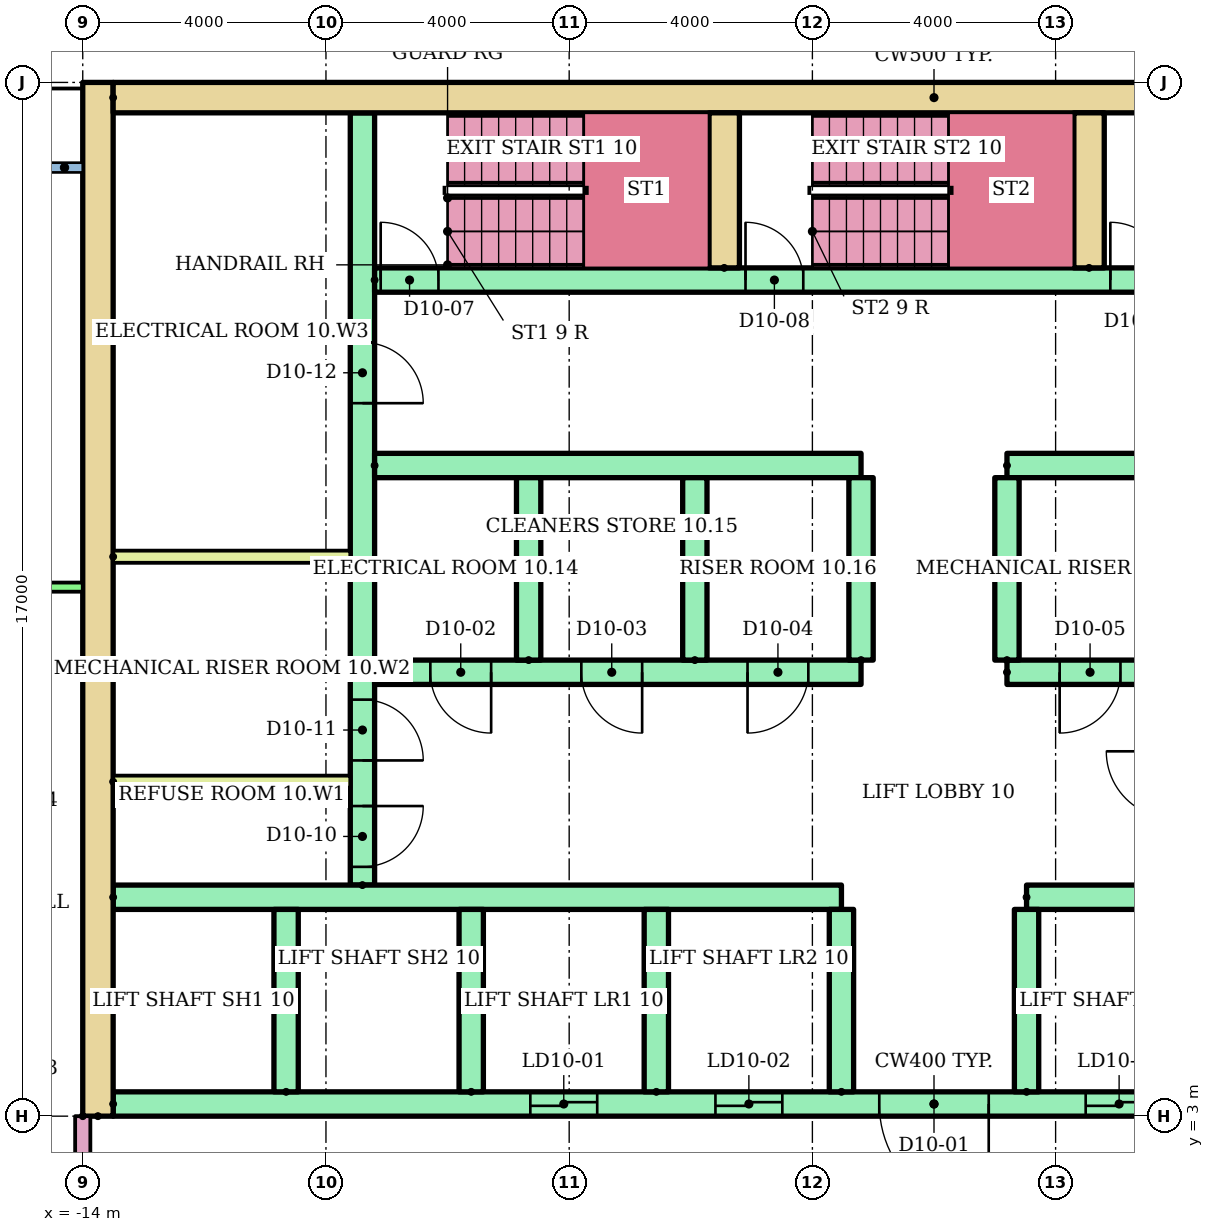
"""IFC4 building model, lengths in metres.
Left out: names, types, materials, properties, quantities, classifications, styles, units other than length and angle.
Written with IfcOpenShell. Run it as: python <this file> out.ifc"""

import sys

from ifc_helpers import new_model, si_unit, direction, frame, frame_2d, origin, place, context, subcontext, project, spatial, rectangle, extrude, element, fill, save


model = new_model("IFC4")
c1 = context("Model", 3, precision=1e-05, world=origin(), true_north=direction((0.0, 1.0)))
c2 = subcontext(c1, "Body", "Model", "MODEL_VIEW")
j1 = project(units=[si_unit("LENGTHUNIT", "METRE"), si_unit("PLANEANGLEUNIT", "RADIAN")], contexts=[c1])
p1 = place(None, origin())
s1 = spatial("IfcSite", under=j1, at=p1, CompositionType="ELEMENT")
p2 = place(p1, origin())
s2 = spatial("IfcBuilding", under=s1, at=p2, CompositionType="ELEMENT")
p3 = place(p2, frame((0.0, 0.0, 41.6)))
s3 = spatial("IfcBuildingStorey", under=s2, at=p3, CompositionType="ELEMENT", Elevation=41.6)
p4 = place(p3, frame((-13.75, 3.0, 0.0), z_axis=(0.0, 0.0, 1.0), x_axis=(0.0, 1.0, 0.0)))
e1 = element("IfcWall", 1, at=p4, inside=s3, PredefinedType="SHEAR", context=c2, shape_type="SweptSolid", body=[
    extrude(rectangle(XDim=17.0, YDim=0.5, at=frame_2d((8.5, 0.0))), origin(), (0.0, 0.0, 1.0), 2.92),
])
p5 = place(p3, frame((-13.5, 19.75, 0.0)))
e2 = element("IfcWall", 2, at=p5, inside=s3, PredefinedType="SHEAR", context=c2, shape_type="SweptSolid", body=[
    extrude(rectangle(XDim=27.0, YDim=0.5, at=frame_2d((13.5, 0.0))), origin(), (0.0, 0.0, 1.0), 2.92),
])
p6 = place(p3, frame((-9.4, 6.8, 0.0), z_axis=(0.0, 0.0, 1.0), x_axis=(0.0, 1.0, 0.0)))
e3 = element("IfcWall", 3, at=p6, inside=s3, PredefinedType="SHEAR", context=c2, shape_type="SweptSolid", body=[
    extrude(rectangle(XDim=12.7, YDim=0.4, at=frame_2d((6.35, 0.0))), origin(), (0.0, 0.0, 1.0), 2.92),
])
p7 = place(p6, frame((0.3, 0.0, 0.0)))
e4 = element("IfcOpeningElement", 4, at=p7, cuts=e3, PredefinedType="OPENING", context=c2, shape_type="SweptSolid", body=[
    extrude(rectangle(XDim=1.0, YDim=2.1, at=frame_2d((0.5, 1.05))), frame((0.0, 0.21, 0.0), z_axis=(0.0, -1.0, 0.0), x_axis=(1.0, 0.0, 0.0)), (0.0, 0.0, 1.0), 0.42),
])
p8 = place(p6, frame((2.05, 0.0, 0.0)))
e5 = element("IfcOpeningElement", 5, at=p8, cuts=e3, PredefinedType="OPENING", context=c2, shape_type="SweptSolid", body=[
    extrude(rectangle(XDim=1.0, YDim=2.1, at=frame_2d((0.5, 1.05))), frame((0.0, 0.21, 0.0), z_axis=(0.0, -1.0, 0.0), x_axis=(1.0, 0.0, 0.0)), (0.0, 0.0, 1.0), 0.42),
])
p9 = place(p6, frame((7.925, 0.0, 0.0)))
e6 = element("IfcOpeningElement", 6, at=p9, cuts=e3, PredefinedType="OPENING", context=c2, shape_type="SweptSolid", body=[
    extrude(rectangle(XDim=1.0, YDim=2.1, at=frame_2d((0.5, 1.05))), frame((0.0, 0.21, 0.0), z_axis=(0.0, -1.0, 0.0), x_axis=(1.0, 0.0, 0.0)), (0.0, 0.0, 1.0), 0.42),
])
p10 = place(p3, frame((-13.5, 3.2, 0.0)))
e7 = element("IfcWall", 7, at=p10, inside=s3, PredefinedType="SHEAR", context=c2, shape_type="SweptSolid", body=[
    extrude(rectangle(XDim=27.0, YDim=0.4, at=frame_2d((13.5, 0.0))), origin(), (0.0, 0.0, 1.0), 2.92),
])
p11 = place(p10, frame((6.861, 0.0, 0.0)))
e8 = element("IfcOpeningElement", 8, at=p11, cuts=e7, PredefinedType="OPENING", context=c2, shape_type="SweptSolid", body=[
    extrude(rectangle(XDim=1.1, YDim=2.1, at=frame_2d((0.55, 1.05))), frame((0.0, 0.21, 0.0), z_axis=(0.0, -1.0, 0.0), x_axis=(1.0, 0.0, 0.0)), (0.0, 0.0, 1.0), 0.42),
])
p12 = place(p10, frame((9.906, 0.0, 0.0)))
e9 = element("IfcOpeningElement", 9, at=p12, cuts=e7, PredefinedType="OPENING", context=c2, shape_type="SweptSolid", body=[
    extrude(rectangle(XDim=1.1, YDim=2.1, at=frame_2d((0.55, 1.05))), frame((0.0, 0.21, 0.0), z_axis=(0.0, -1.0, 0.0), x_axis=(1.0, 0.0, 0.0)), (0.0, 0.0, 1.0), 0.42),
])
p13 = place(p10, frame((15.994, 0.0, 0.0)))
e10 = element("IfcOpeningElement", 10, at=p13, cuts=e7, PredefinedType="OPENING", context=c2, shape_type="SweptSolid", body=[
    extrude(rectangle(XDim=1.1, YDim=2.1, at=frame_2d((0.55, 1.05))), frame((0.0, 0.21, 0.0), z_axis=(0.0, -1.0, 0.0), x_axis=(1.0, 0.0, 0.0)), (0.0, 0.0, 1.0), 0.42),
])
p14 = place(p10, frame((19.039, 0.0, 0.0)))
e11 = element("IfcOpeningElement", 11, at=p14, cuts=e7, PredefinedType="OPENING", context=c2, shape_type="SweptSolid", body=[
    extrude(rectangle(XDim=1.1, YDim=2.1, at=frame_2d((0.55, 1.05))), frame((0.0, 0.21, 0.0), z_axis=(0.0, -1.0, 0.0), x_axis=(1.0, 0.0, 0.0)), (0.0, 0.0, 1.0), 0.42),
])
p15 = place(p10, frame((12.6, 0.0, 0.0)))
e12 = element("IfcOpeningElement", 12, at=p15, cuts=e7, PredefinedType="OPENING", context=c2, shape_type="SweptSolid", body=[
    extrude(rectangle(XDim=1.8, YDim=2.1, at=frame_2d((0.9, 1.05))), frame((0.0, 0.21, 0.0), z_axis=(0.0, -1.0, 0.0), x_axis=(1.0, 0.0, 0.0)), (0.0, 0.0, 1.0), 0.42),
])
p16 = place(p3, frame((-13.5, 6.6, 0.0)))
e13 = element("IfcWall", 13, at=p16, inside=s3, PredefinedType="SHEAR", context=c2, shape_type="SweptSolid", body=[
    extrude(rectangle(XDim=11.978, YDim=0.4, at=frame_2d((5.989, 0.0))), origin(), (0.0, 0.0, 1.0), 2.92),
])
p17 = place(p3, frame((1.522, 6.6, 0.0)))
e14 = element("IfcWall", 14, at=p17, inside=s3, PredefinedType="SHEAR", context=c2, shape_type="SweptSolid", body=[
    extrude(rectangle(XDim=8.078, YDim=0.4, at=frame_2d((4.039, 0.0))), origin(), (0.0, 0.0, 1.0), 2.92),
])
for number, where, z_axis, x_axis in (
    (15, (-10.656, 3.4, 0.0), (0.0, 0.0, 1.0), (0.0, 1.0, 0.0)),
    (16, (-7.611, 3.4, 0.0), (0.0, 0.0, 1.0), (0.0, 1.0, 0.0)),
    (17, (-4.567, 3.4, 0.0), (0.0, 0.0, 1.0), (0.0, 1.0, 0.0)),
    (18, (-1.522, 3.4, 0.0), (0.0, 0.0, 1.0), (0.0, 1.0, 0.0)),
    (19, (1.522, 3.4, 0.0), (0.0, 0.0, 1.0), (0.0, 1.0, 0.0)),
):
    element("IfcWall", number, at=place(p3, frame(where, z_axis=z_axis, x_axis=x_axis)), inside=s3, PredefinedType="SHEAR", context=c2, shape_type="SweptSolid", body=[
        extrude(rectangle(XDim=3.0, YDim=0.4, at=frame_2d((1.5, 0.0))), origin(), (0.0, 0.0, 1.0), 2.92),
    ])
p18 = place(p3, frame((-9.2, 10.3, 0.0)))
e20 = element("IfcWall", 20, at=p18, inside=s3, PredefinedType="SHEAR", context=c2, shape_type="SweptSolid", body=[
    extrude(rectangle(XDim=8.0, YDim=0.4, at=frame_2d((4.0, 0.0))), origin(), (0.0, 0.0, 1.0), 2.92),
])
p19 = place(p18, frame((0.917, 0.0, 0.0)))
e21 = element("IfcOpeningElement", 21, at=p19, cuts=e20, PredefinedType="OPENING", context=c2, shape_type="SweptSolid", body=[
    extrude(rectangle(XDim=1.0, YDim=2.1, at=frame_2d((0.5, 1.05))), frame((0.0, 0.21, 0.0), z_axis=(0.0, -1.0, 0.0), x_axis=(1.0, 0.0, 0.0)), (0.0, 0.0, 1.0), 0.42),
])
p20 = place(p18, frame((3.4, 0.0, 0.0)))
e22 = element("IfcOpeningElement", 22, at=p20, cuts=e20, PredefinedType="OPENING", context=c2, shape_type="SweptSolid", body=[
    extrude(rectangle(XDim=1.0, YDim=2.1, at=frame_2d((0.5, 1.05))), frame((0.0, 0.21, 0.0), z_axis=(0.0, -1.0, 0.0), x_axis=(1.0, 0.0, 0.0)), (0.0, 0.0, 1.0), 0.42),
])
p21 = place(p18, frame((6.133, 0.0, 0.0)))
e23 = element("IfcOpeningElement", 23, at=p21, cuts=e20, PredefinedType="OPENING", context=c2, shape_type="SweptSolid", body=[
    extrude(rectangle(XDim=1.0, YDim=2.1, at=frame_2d((0.5, 1.05))), frame((0.0, 0.21, 0.0), z_axis=(0.0, -1.0, 0.0), x_axis=(1.0, 0.0, 0.0)), (0.0, 0.0, 1.0), 0.42),
])
p22 = place(p3, frame((-9.2, 13.7, 0.0)))
e24 = element("IfcWall", 24, at=p22, inside=s3, PredefinedType="SHEAR", context=c2, shape_type="SweptSolid", body=[
    extrude(rectangle(XDim=8.0, YDim=0.4, at=frame_2d((4.0, 0.0))), origin(), (0.0, 0.0, 1.0), 2.92),
])
p23 = place(p3, frame((1.2, 10.3, 0.0)))
e25 = element("IfcWall", 25, at=p23, inside=s3, PredefinedType="SHEAR", context=c2, shape_type="SweptSolid", body=[
    extrude(rectangle(XDim=8.0, YDim=0.4, at=frame_2d((4.0, 0.0))), origin(), (0.0, 0.0, 1.0), 2.92),
])
p24 = place(p23, frame((3.55, 0.0, 0.0)))
e26 = element("IfcOpeningElement", 26, at=p24, cuts=e25, PredefinedType="OPENING", context=c2, shape_type="SweptSolid", body=[
    extrude(rectangle(XDim=1.1, YDim=2.1, at=frame_2d((0.55, 1.05))), frame((0.0, 0.21, 0.0), z_axis=(0.0, -1.0, 0.0), x_axis=(1.0, 0.0, 0.0)), (0.0, 0.0, 1.0), 0.42),
])
p25 = place(p23, frame((6.283, 0.0, 0.0)))
e27 = element("IfcOpeningElement", 27, at=p25, cuts=e25, PredefinedType="OPENING", context=c2, shape_type="SweptSolid", body=[
    extrude(rectangle(XDim=1.1, YDim=2.1, at=frame_2d((0.55, 1.05))), frame((0.0, 0.21, 0.0), z_axis=(0.0, -1.0, 0.0), x_axis=(1.0, 0.0, 0.0)), (0.0, 0.0, 1.0), 0.42),
])
p26 = place(p23, frame((0.867, 0.0, 0.0)))
e28 = element("IfcOpeningElement", 28, at=p26, cuts=e25, PredefinedType="OPENING", context=c2, shape_type="SweptSolid", body=[
    extrude(rectangle(XDim=1.0, YDim=2.1, at=frame_2d((0.5, 1.05))), frame((0.0, 0.21, 0.0), z_axis=(0.0, -1.0, 0.0), x_axis=(1.0, 0.0, 0.0)), (0.0, 0.0, 1.0), 0.42),
])
p27 = place(p3, frame((1.2, 13.7, 0.0)))
e29 = element("IfcWall", 29, at=p27, inside=s3, PredefinedType="SHEAR", context=c2, shape_type="SweptSolid", body=[
    extrude(rectangle(XDim=8.0, YDim=0.4, at=frame_2d((4.0, 0.0))), origin(), (0.0, 0.0, 1.0), 2.92),
])
for number, where, z_axis, x_axis in (
    (30, (-6.667, 10.5, 0.0), (0.0, 0.0, 1.0), (0.0, 1.0, 0.0)),
    (31, (-3.933, 10.5, 0.0), (0.0, 0.0, 1.0), (0.0, 1.0, 0.0)),
    (32, (-1.2, 10.5, 0.0), (0.0, 0.0, 1.0), (0.0, 1.0, 0.0)),
    (33, (1.2, 10.5, 0.0), (0.0, 0.0, 1.0), (0.0, 1.0, 0.0)),
):
    element("IfcWall", number, at=place(p3, frame(where, z_axis=z_axis, x_axis=x_axis)), inside=s3, PredefinedType="SHEAR", context=c2, shape_type="SweptSolid", body=[
        extrude(rectangle(XDim=3.0, YDim=0.4, at=frame_2d((1.5, 0.0))), origin(), (0.0, 0.0, 1.0), 2.92),
    ])
p28 = place(p3, frame((-9.2, 16.75, 0.0)))
e34 = element("IfcWall", 34, at=p28, inside=s3, PredefinedType="SHEAR", context=c2, shape_type="SweptSolid", body=[
    extrude(rectangle(XDim=18.4, YDim=0.4, at=frame_2d((9.2, 0.0))), origin(), (0.0, 0.0, 1.0), 2.92),
])
p29 = place(p28, frame((0.1, 0.0, 0.0)))
e35 = element("IfcOpeningElement", 35, at=p29, cuts=e34, PredefinedType="OPENING", context=c2, shape_type="SweptSolid", body=[
    extrude(rectangle(XDim=0.95, YDim=2.1, at=frame_2d((0.475, 1.05))), frame((0.0, 0.21, 0.0), z_axis=(0.0, -1.0, 0.0), x_axis=(1.0, 0.0, 0.0)), (0.0, 0.0, 1.0), 0.42),
])
p30 = place(p28, frame((6.1, 0.0, 0.0)))
e36 = element("IfcOpeningElement", 36, at=p30, cuts=e34, PredefinedType="OPENING", context=c2, shape_type="SweptSolid", body=[
    extrude(rectangle(XDim=0.95, YDim=2.1, at=frame_2d((0.475, 1.05))), frame((0.0, 0.21, 0.0), z_axis=(0.0, -1.0, 0.0), x_axis=(1.0, 0.0, 0.0)), (0.0, 0.0, 1.0), 0.42),
])
p31 = place(p28, frame((12.1, 0.0, 0.0)))
e37 = element("IfcOpeningElement", 37, at=p31, cuts=e34, PredefinedType="OPENING", context=c2, shape_type="SweptSolid", body=[
    extrude(rectangle(XDim=0.95, YDim=2.1, at=frame_2d((0.475, 1.05))), frame((0.0, 0.21, 0.0), z_axis=(0.0, -1.0, 0.0), x_axis=(1.0, 0.0, 0.0)), (0.0, 0.0, 1.0), 0.42),
])
for number, where, z_axis, x_axis in (
    (38, (-3.45, 16.95, 0.0), (0.0, 0.0, 1.0), (0.0, 1.0, 0.0)),
    (39, (2.55, 16.95, 0.0), (0.0, 0.0, 1.0), (0.0, 1.0, 0.0)),
):
    element("IfcWall", number, at=place(p3, frame(where, z_axis=z_axis, x_axis=x_axis)), inside=s3, PredefinedType="SHEAR", context=c2, shape_type="SweptSolid", body=[
        extrude(rectangle(XDim=2.55, YDim=0.5, at=frame_2d((1.275, 0.0))), origin(), (0.0, 0.0, 1.0), 2.92),
    ])
for number, where in (
    (40, (-13.5, 8.5, 0.0)),
    (41, (-13.5, 12.2, 0.0)),
):
    element("IfcWall", number, at=place(p3, frame(where)), inside=s3, PredefinedType="PARTITIONING", context=c2, shape_type="SweptSolid", body=[
        extrude(rectangle(XDim=3.9, YDim=0.2, at=frame_2d((1.95, 0.0))), origin(), (0.0, 0.0, 1.0), 2.92),
    ])
p32 = place(p3, frame((-36.52, 11.7, 0.0)))
e42 = element("IfcWall", 42, at=p32, inside=s3, PredefinedType="PARTITIONING", context=c2, shape_type="SweptSolid", body=[
    extrude(rectangle(XDim=22.52, YDim=0.15, at=frame_2d((11.26, 0.0))), origin(), (0.0, 0.0, 1.0), 2.4),
])
p33 = place(p32, frame((1.97, 0.0, 0.0)))
e43 = element("IfcOpeningElement", 43, at=p33, cuts=e42, PredefinedType="OPENING", context=c2, shape_type="SweptSolid", body=[
    extrude(rectangle(XDim=1.0, YDim=2.1, at=frame_2d((0.5, 1.05))), frame((0.0, 0.085, 0.0), z_axis=(0.0, -1.0, 0.0), x_axis=(1.0, 0.0, 0.0)), (0.0, 0.0, 1.0), 0.17),
])
p34 = place(p32, frame((9.17, 0.0, 0.0)))
e44 = element("IfcOpeningElement", 44, at=p34, cuts=e42, PredefinedType="OPENING", context=c2, shape_type="SweptSolid", body=[
    extrude(rectangle(XDim=0.9, YDim=2.1, at=frame_2d((0.45, 1.05))), frame((0.0, 0.085, 0.0), z_axis=(0.0, -1.0, 0.0), x_axis=(1.0, 0.0, 0.0)), (0.0, 0.0, 1.0), 0.17),
])
p35 = place(p32, frame((18.07, 0.0, 0.0)))
e45 = element("IfcOpeningElement", 45, at=p35, cuts=e42, PredefinedType="OPENING", context=c2, shape_type="SweptSolid", body=[
    extrude(rectangle(XDim=0.9, YDim=2.1, at=frame_2d((0.45, 1.05))), frame((0.0, 0.085, 0.0), z_axis=(0.0, -1.0, 0.0), x_axis=(1.0, 0.0, 0.0)), (0.0, 0.0, 1.0), 0.17),
])
p36 = place(p3, frame((-14.0, 3.0, 0.0), z_axis=(0.0, 0.0, 1.0), x_axis=(0.0, -1.0, 0.0)))
e46 = element("IfcWall", 46, at=p36, inside=s3, PredefinedType="PARTITIONING", context=c2, shape_type="SweptSolid", body=[
    extrude(rectangle(XDim=1.6, YDim=0.25, at=frame_2d((0.8, 0.0))), origin(), (0.0, 0.0, 1.0), 2.4),
])
p37 = place(p11, origin())
e47 = element("IfcDoor", 47, at=p37, inside=s3, OperationType="SLIDING_TO_LEFT", PredefinedType="DOOR", context=c2, shape_type="SweptSolid", body=[
    extrude(rectangle(XDim=1.1, YDim=2.1, at=frame_2d((0.55, 1.05))), frame((0.0, 0.025, 0.0), z_axis=(0.0, -1.0, 0.0), x_axis=(1.0, 0.0, 0.0)), (0.0, 0.0, 1.0), 0.05),
])
fill(e8, e47)
p38 = place(p12, origin())
e48 = element("IfcDoor", 48, at=p38, inside=s3, OperationType="SLIDING_TO_LEFT", PredefinedType="DOOR", context=c2, shape_type="SweptSolid", body=[
    extrude(rectangle(XDim=1.1, YDim=2.1, at=frame_2d((0.55, 1.05))), frame((0.0, 0.025, 0.0), z_axis=(0.0, -1.0, 0.0), x_axis=(1.0, 0.0, 0.0)), (0.0, 0.0, 1.0), 0.05),
])
fill(e9, e48)
p39 = place(p13, origin())
e49 = element("IfcDoor", 49, at=p39, inside=s3, OperationType="SLIDING_TO_LEFT", PredefinedType="DOOR", context=c2, shape_type="SweptSolid", body=[
    extrude(rectangle(XDim=1.1, YDim=2.1, at=frame_2d((0.55, 1.05))), frame((0.0, 0.025, 0.0), z_axis=(0.0, -1.0, 0.0), x_axis=(1.0, 0.0, 0.0)), (0.0, 0.0, 1.0), 0.05),
])
fill(e10, e49)
p40 = place(p15, frame((1.8, 0.0, 0.0), z_axis=(0.0, 0.0, 1.0), x_axis=(-1.0, 0.0, 0.0)))
e50 = element("IfcDoor", 50, at=p40, inside=s3, OperationType="DOUBLE_DOOR_SINGLE_SWING", PredefinedType="DOOR", context=c2, shape_type="SweptSolid", body=[
    extrude(rectangle(XDim=1.8, YDim=2.1, at=frame_2d((0.9, 1.05))), frame((0.0, 0.025, 0.0), z_axis=(0.0, -1.0, 0.0), x_axis=(1.0, 0.0, 0.0)), (0.0, 0.0, 1.0), 0.05),
])
fill(e12, e50)
p41 = place(p19, frame((1.0, 0.0, 0.0), z_axis=(0.0, 0.0, 1.0), x_axis=(-1.0, 0.0, 0.0)))
e51 = element("IfcDoor", 51, at=p41, inside=s3, OperationType="SINGLE_SWING_RIGHT", PredefinedType="DOOR", context=c2, shape_type="SweptSolid", body=[
    extrude(rectangle(XDim=1.0, YDim=2.1, at=frame_2d((0.5, 1.05))), frame((0.0, 0.025, 0.0), z_axis=(0.0, -1.0, 0.0), x_axis=(1.0, 0.0, 0.0)), (0.0, 0.0, 1.0), 0.05),
])
fill(e21, e51)
p42 = place(p20, frame((1.0, 0.0, 0.0), z_axis=(0.0, 0.0, 1.0), x_axis=(-1.0, 0.0, 0.0)))
e52 = element("IfcDoor", 52, at=p42, inside=s3, OperationType="SINGLE_SWING_RIGHT", PredefinedType="DOOR", context=c2, shape_type="SweptSolid", body=[
    extrude(rectangle(XDim=1.0, YDim=2.1, at=frame_2d((0.5, 1.05))), frame((0.0, 0.025, 0.0), z_axis=(0.0, -1.0, 0.0), x_axis=(1.0, 0.0, 0.0)), (0.0, 0.0, 1.0), 0.05),
])
fill(e22, e52)
p43 = place(p21, frame((1.0, 0.0, 0.0), z_axis=(0.0, 0.0, 1.0), x_axis=(-1.0, 0.0, 0.0)))
e53 = element("IfcDoor", 53, at=p43, inside=s3, OperationType="SINGLE_SWING_LEFT", PredefinedType="DOOR", context=c2, shape_type="SweptSolid", body=[
    extrude(rectangle(XDim=1.0, YDim=2.1, at=frame_2d((0.5, 1.05))), frame((0.0, 0.025, 0.0), z_axis=(0.0, -1.0, 0.0), x_axis=(1.0, 0.0, 0.0)), (0.0, 0.0, 1.0), 0.05),
])
fill(e23, e53)
p44 = place(p26, frame((1.0, 0.0, 0.0), z_axis=(0.0, 0.0, 1.0), x_axis=(-1.0, 0.0, 0.0)))
e54 = element("IfcDoor", 54, at=p44, inside=s3, OperationType="SINGLE_SWING_LEFT", PredefinedType="DOOR", context=c2, shape_type="SweptSolid", body=[
    extrude(rectangle(XDim=1.0, YDim=2.1, at=frame_2d((0.5, 1.05))), frame((0.0, 0.025, 0.0), z_axis=(0.0, -1.0, 0.0), x_axis=(1.0, 0.0, 0.0)), (0.0, 0.0, 1.0), 0.05),
])
fill(e28, e54)
p45 = place(p29, origin())
e55 = element("IfcDoor", 55, at=p45, inside=s3, OperationType="SINGLE_SWING_LEFT", PredefinedType="DOOR", context=c2, shape_type="SweptSolid", body=[
    extrude(rectangle(XDim=0.95, YDim=2.1, at=frame_2d((0.475, 1.05))), frame((0.0, 0.025, 0.0), z_axis=(0.0, -1.0, 0.0), x_axis=(1.0, 0.0, 0.0)), (0.0, 0.0, 1.0), 0.05),
])
fill(e35, e55)
p46 = place(p30, origin())
e56 = element("IfcDoor", 56, at=p46, inside=s3, OperationType="SINGLE_SWING_LEFT", PredefinedType="DOOR", context=c2, shape_type="SweptSolid", body=[
    extrude(rectangle(XDim=0.95, YDim=2.1, at=frame_2d((0.475, 1.05))), frame((0.0, 0.025, 0.0), z_axis=(0.0, -1.0, 0.0), x_axis=(1.0, 0.0, 0.0)), (0.0, 0.0, 1.0), 0.05),
])
fill(e36, e56)
p47 = place(p31, origin())
e57 = element("IfcDoor", 57, at=p47, inside=s3, OperationType="SINGLE_SWING_LEFT", PredefinedType="DOOR", context=c2, shape_type="SweptSolid", body=[
    extrude(rectangle(XDim=0.95, YDim=2.1, at=frame_2d((0.475, 1.05))), frame((0.0, 0.025, 0.0), z_axis=(0.0, -1.0, 0.0), x_axis=(1.0, 0.0, 0.0)), (0.0, 0.0, 1.0), 0.05),
])
fill(e37, e57)
p48 = place(p7, frame((1.0, 0.0, 0.0), z_axis=(0.0, 0.0, 1.0), x_axis=(-1.0, 0.0, 0.0)))
e58 = element("IfcDoor", 58, at=p48, inside=s3, OperationType="SINGLE_SWING_RIGHT", PredefinedType="DOOR", context=c2, shape_type="SweptSolid", body=[
    extrude(rectangle(XDim=1.0, YDim=2.1, at=frame_2d((0.5, 1.05))), frame((0.0, 0.025, 0.0), z_axis=(0.0, -1.0, 0.0), x_axis=(1.0, 0.0, 0.0)), (0.0, 0.0, 1.0), 0.05),
])
fill(e4, e58)
p49 = place(p8, frame((1.0, 0.0, 0.0), z_axis=(0.0, 0.0, 1.0), x_axis=(-1.0, 0.0, 0.0)))
e59 = element("IfcDoor", 59, at=p49, inside=s3, OperationType="SINGLE_SWING_LEFT", PredefinedType="DOOR", context=c2, shape_type="SweptSolid", body=[
    extrude(rectangle(XDim=1.0, YDim=2.1, at=frame_2d((0.5, 1.05))), frame((0.0, 0.025, 0.0), z_axis=(0.0, -1.0, 0.0), x_axis=(1.0, 0.0, 0.0)), (0.0, 0.0, 1.0), 0.05),
])
fill(e5, e59)
p50 = place(p9, frame((1.0, 0.0, 0.0), z_axis=(0.0, 0.0, 1.0), x_axis=(-1.0, 0.0, 0.0)))
e60 = element("IfcDoor", 60, at=p50, inside=s3, OperationType="SINGLE_SWING_LEFT", PredefinedType="DOOR", context=c2, shape_type="SweptSolid", body=[
    extrude(rectangle(XDim=1.0, YDim=2.1, at=frame_2d((0.5, 1.05))), frame((0.0, 0.025, 0.0), z_axis=(0.0, -1.0, 0.0), x_axis=(1.0, 0.0, 0.0)), (0.0, 0.0, 1.0), 0.05),
])
fill(e6, e60)
save(model, sys.argv[1])
